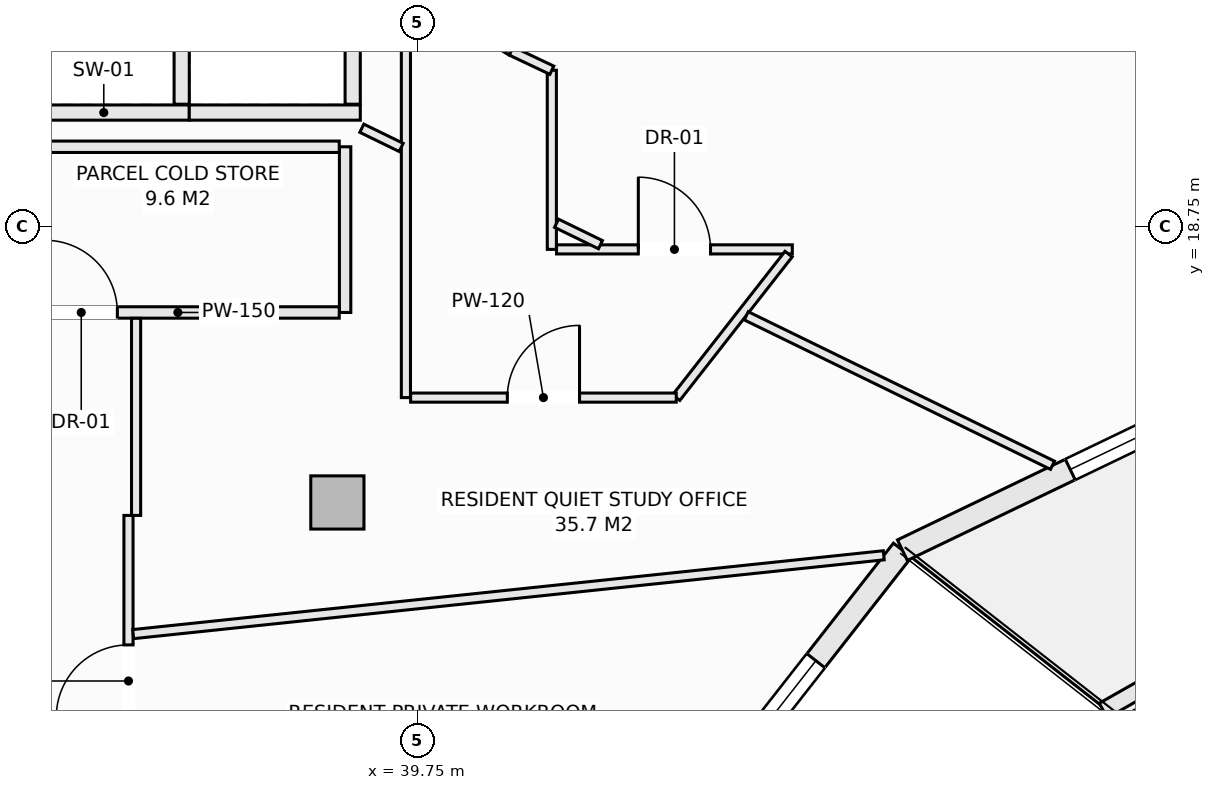
"""IFC4 building model, lengths in metres.
Left out: names, types, materials, properties, quantities, classifications, styles, units other than length and angle.
Written with IfcOpenShell. Run it as: python <this file> out.ifc"""

import sys

from ifc_helpers import new_model, si_unit, direction, frame, frame_2d, origin, origin_2d, place, context, subcontext, project, spatial, rectangle, extrude, element, fill, save


model = new_model("IFC4")
c1 = context("Model", 3, precision=1e-05, world=origin(), true_north=direction((0.0, 1.0)))
c2 = subcontext(c1, "Body", "Model", "MODEL_VIEW")
j1 = project(units=[si_unit("LENGTHUNIT", "METRE"), si_unit("PLANEANGLEUNIT", "RADIAN")], contexts=[c1])
p1 = place(None, origin())
s1 = spatial("IfcSite", under=j1, at=p1, CompositionType="ELEMENT")
p2 = place(p1, origin())
s2 = spatial("IfcBuilding", under=s1, at=p2, CompositionType="ELEMENT")
p3 = place(p2, frame((0.0, 0.0, 216.2)))
s3 = spatial("IfcBuildingStorey", under=s2, at=p3, CompositionType="ELEMENT", Elevation=216.2)
p4 = place(p3, frame((38.698, 15.121, -0.27), z_axis=(0.0, 0.0, 1.0), x_axis=(1.0, 0.0, 0.0)))
e1 = element("IfcColumn", 1, at=p4, inside=s3, PredefinedType="COLUMN", context=c2, shape_type="SweptSolid", body=[
    extrude(rectangle(XDim=0.7, YDim=0.7, at=origin_2d()), origin(), (0.0, 0.0, 1.0), 3.3),
])
p5 = place(p3, frame((42.5, 9.853, 0.0), z_axis=(0.0, 0.0, 1.0), x_axis=(0.616450126935, 0.787393955401, 0.0)))
e2 = element("IfcWall", 2, at=p5, inside=s3, PredefinedType="SOLIDWALL", context=c2, shape_type="SweptSolid", body=[
    extrude(rectangle(XDim=5.893, YDim=0.3, at=frame_2d((2.946, 0.0))), origin(), (0.0, 0.0, 1.0), 2.605),
])
p6 = place(p5, frame((1.846, 0.0, 0.72)))
e3 = element("IfcOpeningElement", 3, at=p6, cuts=e2, PredefinedType="OPENING", context=c2, shape_type="SweptSolid", body=[
    extrude(rectangle(XDim=2.2, YDim=1.65, at=frame_2d((1.1, 0.825))), frame((0.0, 0.16, 0.0), z_axis=(0.0, -1.0, 0.0), x_axis=(1.0, 0.0, 0.0)), (0.0, 0.0, 1.0), 0.32),
])
p7 = place(p3, frame((46.133, 14.493, 0.0), z_axis=(0.0, 0.0, 1.0), x_axis=(0.901348331142, 0.433094892545, 0.0)))
e4 = element("IfcWall", 4, at=p7, inside=s3, PredefinedType="SOLIDWALL", context=c2, shape_type="SweptSolid", body=[
    extrude(rectangle(XDim=6.021, YDim=0.3, at=frame_2d((3.01, 0.0))), origin(), (0.0, 0.0, 1.0), 2.605),
])
p8 = place(p7, frame((2.45, 0.0, 0.72)))
e5 = element("IfcOpeningElement", 5, at=p8, cuts=e4, PredefinedType="OPENING", context=c2, shape_type="SweptSolid", body=[
    extrude(rectangle(XDim=2.2, YDim=1.65, at=frame_2d((1.1, 0.825))), frame((0.0, 0.16, 0.0), z_axis=(0.0, -1.0, 0.0), x_axis=(1.0, 0.0, 0.0)), (0.0, 0.0, 1.0), 0.32),
])
p9 = place(p3, frame((48.776, 12.383, 0.0), z_axis=(0.0, 0.0, 1.0), x_axis=(0.869860619267, 0.493297580623, 0.0)))
e6 = element("IfcWall", 6, at=p9, inside=s3, PredefinedType="PARAPET", context=c2, shape_type="SweptSolid", body=[
    extrude(rectangle(XDim=6.743, YDim=0.22, at=frame_2d((3.371, 0.0))), origin(), (0.0, 0.0, 1.0), 0.52),
])
p10 = place(p3, frame((34.5, 20.25, 0.0), z_axis=(0.0, 0.0, 1.0), x_axis=(1.0, 0.0, 0.0)))
e7 = element("IfcWall", 7, at=p10, inside=s3, PredefinedType="SOLIDWALL", context=c2, shape_type="SweptSolid", body=[
    extrude(rectangle(XDim=2.25, YDim=0.2, at=frame_2d((1.125, 0.0))), origin(), (0.0, 0.0, 1.0), 3.03),
])
p11 = place(p3, frame((36.65, 20.36, 0.0), z_axis=(0.0, 0.0, 1.0), x_axis=(0.0, 1.0, 0.0)))
e8 = element("IfcWall", 8, at=p11, inside=s3, PredefinedType="SOLIDWALL", context=c2, shape_type="SweptSolid", body=[
    extrude(rectangle(XDim=2.43, YDim=0.2, at=frame_2d((1.215, 0.0))), origin(), (0.0, 0.0, 1.0), 3.03),
])
p12 = place(p3, frame((36.75, 20.25, 0.0), z_axis=(0.0, 0.0, 1.0), x_axis=(1.0, 0.0, 0.0)))
e9 = element("IfcWall", 9, at=p12, inside=s3, PredefinedType="SOLIDWALL", context=c2, shape_type="SweptSolid", body=[
    extrude(rectangle(XDim=2.25, YDim=0.2, at=frame_2d((1.125, 0.0))), origin(), (0.0, 0.0, 1.0), 3.03),
])
p13 = place(p3, frame((38.9, 20.36, 0.0), z_axis=(0.0, 0.0, 1.0), x_axis=(0.0, 1.0, 0.0)))
e10 = element("IfcWall", 10, at=p13, inside=s3, PredefinedType="SOLIDWALL", context=c2, shape_type="SweptSolid", body=[
    extrude(rectangle(XDim=2.43, YDim=0.2, at=frame_2d((1.215, 0.0))), origin(), (0.0, 0.0, 1.0), 3.03),
])
p14 = place(p3, frame((38.8, 17.62, 0.0), z_axis=(0.0, 0.0, 1.0), x_axis=(0.0, 1.0, 0.0)))
e11 = element("IfcWall", 11, at=p14, inside=s3, PredefinedType="PARTITIONING", context=c2, shape_type="SweptSolid", body=[
    extrude(rectangle(XDim=2.18, YDim=0.15, at=frame_2d((1.09, 0.0))), origin(), (0.0, 0.0, 1.0), 3.03),
])
p15 = place(p3, frame((34.477, 17.62, 0.0), z_axis=(0.0, 0.0, 1.0), x_axis=(1.0, 0.0, 0.0)))
e12 = element("IfcWall", 12, at=p15, inside=s3, PredefinedType="PARTITIONING", context=c2, shape_type="SweptSolid", body=[
    extrude(rectangle(XDim=4.246, YDim=0.15, at=frame_2d((2.123, 0.0))), origin(), (0.0, 0.0, 1.0), 3.03),
])
p16 = place(p15, frame((0.376, 0.0, 0.0)))
e13 = element("IfcOpeningElement", 13, at=p16, cuts=e12, PredefinedType="OPENING", context=c2, shape_type="SweptSolid", body=[
    extrude(rectangle(XDim=0.95, YDim=2.1, at=frame_2d((0.475, 1.05))), frame((0.0, 0.085, 0.0), z_axis=(0.0, -1.0, 0.0), x_axis=(1.0, 0.0, 0.0)), (0.0, 0.0, 1.0), 0.17),
])
p17 = place(p3, frame((34.477, 19.8, 0.0), z_axis=(0.0, 0.0, 1.0), x_axis=(1.0, 0.0, 0.0)))
e14 = element("IfcWall", 14, at=p17, inside=s3, PredefinedType="PARTITIONING", context=c2, shape_type="SweptSolid", body=[
    extrude(rectangle(XDim=4.246, YDim=0.15, at=frame_2d((2.123, 0.0))), origin(), (0.0, 0.0, 1.0), 3.03),
])
p18 = place(p3, frame((39.6, 16.5, 0.0), z_axis=(0.0, 0.0, 1.0), x_axis=(0.0, 1.0, 0.0)))
e15 = element("IfcWall", 15, at=p18, inside=s3, PredefinedType="PARTITIONING", context=c2, shape_type="SweptSolid", body=[
    extrude(rectangle(XDim=6.52, YDim=0.12, at=frame_2d((3.26, 0.0))), origin(), (0.0, 0.0, 1.0), 2.478),
])
p19 = place(p3, frame((41.52, 18.45, 0.0), z_axis=(0.0, 0.0, 1.0), x_axis=(0.0, 1.0, 0.0)))
e16 = element("IfcWall", 16, at=p19, inside=s3, PredefinedType="PARTITIONING", context=c2, shape_type="SweptSolid", body=[
    extrude(rectangle(XDim=2.357, YDim=0.12, at=frame_2d((1.178, 0.0))), origin(), (0.0, 0.0, 1.0), 3.03),
])
p20 = place(p3, frame((39.81, 21.764, 0.0), z_axis=(0.0, 0.0, 1.0), x_axis=(0.858011245414, -0.513630901273, 0.0)))
e17 = element("IfcWall", 17, at=p20, inside=s3, PredefinedType="PARTITIONING", context=c2, shape_type="SweptSolid", body=[
    extrude(rectangle(XDim=1.37, YDim=0.12, at=frame_2d((0.685, 0.0))), origin(), (0.0, 0.0, 1.0), 3.03),
])
p21 = place(p3, frame((40.986, 21.06, 0.0), z_axis=(0.0, 0.0, 1.0), x_axis=(0.90356951601, -0.428441512621, 0.0)))
e18 = element("IfcWall", 18, at=p21, inside=s3, PredefinedType="PARTITIONING", context=c2, shape_type="SweptSolid", body=[
    extrude(rectangle(XDim=0.591, YDim=0.12, at=frame_2d((0.295, 0.0))), origin(), (0.0, 0.0, 1.0), 3.03),
])
p22 = place(p3, frame((41.582, 18.45, 0.0), z_axis=(0.0, 0.0, 1.0), x_axis=(1.0, 0.0, 0.0)))
e19 = element("IfcWall", 19, at=p22, inside=s3, PredefinedType="PARTITIONING", context=c2, shape_type="SweptSolid", body=[
    extrude(rectangle(XDim=3.102, YDim=0.12, at=frame_2d((1.551, 0.0))), origin(), (0.0, 0.0, 1.0), 3.03),
])
p23 = place(p22, frame((1.076, 0.0, 0.0)))
e20 = element("IfcOpeningElement", 20, at=p23, cuts=e19, PredefinedType="OPENING", context=c2, shape_type="SweptSolid", body=[
    extrude(rectangle(XDim=0.95, YDim=2.1, at=frame_2d((0.475, 1.05))), frame((0.0, 0.07, 0.0), z_axis=(0.0, -1.0, 0.0), x_axis=(1.0, 0.0, 0.0)), (0.0, 0.0, 1.0), 0.14),
])
p24 = place(p3, frame((43.157, 16.5, 0.0), z_axis=(0.0, 0.0, 1.0), x_axis=(0.616566276607, 0.787303008092, 0.0)))
e21 = element("IfcWall", 21, at=p24, inside=s3, PredefinedType="PARTITIONING", context=c2, shape_type="SweptSolid", body=[
    extrude(rectangle(XDim=2.398, YDim=0.12, at=frame_2d((1.199, 0.0))), origin(), (0.0, 0.0, 1.0), 3.03),
])
p25 = place(p3, frame((39.662, 16.5, 0.0), z_axis=(0.0, 0.0, 1.0), x_axis=(1.0, 0.0, 0.0)))
e22 = element("IfcWall", 22, at=p25, inside=s3, PredefinedType="PARTITIONING", context=c2, shape_type="SweptSolid", body=[
    extrude(rectangle(XDim=3.495, YDim=0.12, at=frame_2d((1.748, 0.0))), origin(), (0.0, 0.0, 1.0), 2.77),
])
p26 = place(p25, frame((1.272, 0.0, 0.0)))
e23 = element("IfcOpeningElement", 23, at=p26, cuts=e22, PredefinedType="OPENING", context=c2, shape_type="SweptSolid", body=[
    extrude(rectangle(XDim=0.95, YDim=2.1, at=frame_2d((0.475, 1.05))), frame((0.0, 0.07, 0.0), z_axis=(0.0, -1.0, 0.0), x_axis=(1.0, 0.0, 0.0)), (0.0, 0.0, 1.0), 0.14),
])
p27 = place(p3, frame((36.05, 14.95, 0.0), z_axis=(0.0, 0.0, 1.0), x_axis=(0.0, 1.0, 0.0)))
e24 = element("IfcWall", 24, at=p27, inside=s3, PredefinedType="PARTITIONING", context=c2, shape_type="SweptSolid", body=[
    extrude(rectangle(XDim=2.593, YDim=0.12, at=frame_2d((1.296, 0.0))), origin(), (0.0, 0.0, 1.0), 3.03),
])
p28 = place(p3, frame((35.95, 11.75, 0.0), z_axis=(0.0, 0.0, 1.0), x_axis=(0.0, 1.0, 0.0)))
e25 = element("IfcWall", 25, at=p28, inside=s3, PredefinedType="PARTITIONING", context=c2, shape_type="SweptSolid", body=[
    extrude(rectangle(XDim=3.2, YDim=0.12, at=frame_2d((1.6, 0.0))), origin(), (0.0, 0.0, 1.0), 3.03),
])
p29 = place(p28, frame((0.547, 0.0, 0.0)))
e26 = element("IfcOpeningElement", 26, at=p29, cuts=e25, PredefinedType="OPENING", context=c2, shape_type="SweptSolid", body=[
    extrude(rectangle(XDim=0.95, YDim=2.1, at=frame_2d((0.475, 1.05))), frame((0.0, 0.07, 0.0), z_axis=(0.0, -1.0, 0.0), x_axis=(1.0, 0.0, 0.0)), (0.0, 0.0, 1.0), 0.14),
])
p30 = place(p3, frame((36.012, 13.388, 0.0), z_axis=(0.0, 0.0, 1.0), x_axis=(0.994530215, 0.104449276931, 0.0)))
e27 = element("IfcWall", 27, at=p30, inside=s3, PredefinedType="PARTITIONING", context=c2, shape_type="SweptSolid", body=[
    extrude(rectangle(XDim=9.929, YDim=0.12, at=frame_2d((4.965, 0.0))), origin(), (0.0, 0.0, 1.0), 3.03),
])
p31 = place(p3, frame((39.02, 20.044, 0.0), z_axis=(0.0, 0.0, 1.0), x_axis=(0.898788798226, -0.438381906769, 0.0)))
e28 = element("IfcWall", 28, at=p31, inside=s3, PredefinedType="PARTITIONING", context=c2, shape_type="SweptSolid", body=[
    extrude(rectangle(XDim=0.576, YDim=0.12, at=frame_2d((0.288, 0.0))), origin(), (0.0, 0.0, 1.0), 3.03),
])
p32 = place(p3, frame((41.582, 18.794, 0.0), z_axis=(0.0, 0.0, 1.0), x_axis=(0.898713702737, -0.438535837204, 0.0)))
e29 = element("IfcWall", 29, at=p32, inside=s3, PredefinedType="PARTITIONING", context=c2, shape_type="SweptSolid", body=[
    extrude(rectangle(XDim=0.643, YDim=0.12, at=frame_2d((0.322, 0.0))), origin(), (0.0, 0.0, 1.0), 3.03),
])
p33 = place(p3, frame((44.078, 17.576, 0.0), z_axis=(0.0, 0.0, 1.0), x_axis=(0.898720286075, -0.438522345381, 0.0)))
e30 = element("IfcWall", 30, at=p33, inside=s3, PredefinedType="PARTITIONING", context=c2, shape_type="SweptSolid", body=[
    extrude(rectangle(XDim=4.483, YDim=0.12, at=frame_2d((2.241, 0.0))), origin(), (0.0, 0.0, 1.0), 3.03),
])
p34 = place(p6, origin())
e31 = element("IfcWindow", 31, at=p34, inside=s3, PartitioningType="SINGLE_PANEL", PredefinedType="WINDOW", context=c2, shape_type="SweptSolid", body=[
    extrude(rectangle(XDim=2.2, YDim=1.65, at=frame_2d((1.1, 0.825))), frame((0.0, 0.03, 0.0), z_axis=(0.0, -1.0, 0.0), x_axis=(1.0, 0.0, 0.0)), (0.0, 0.0, 1.0), 0.06),
])
fill(e3, e31)
p35 = place(p8, origin())
e32 = element("IfcWindow", 32, at=p35, inside=s3, PartitioningType="SINGLE_PANEL", PredefinedType="WINDOW", context=c2, shape_type="SweptSolid", body=[
    extrude(rectangle(XDim=2.2, YDim=1.65, at=frame_2d((1.1, 0.825))), frame((0.0, 0.03, 0.0), z_axis=(0.0, -1.0, 0.0), x_axis=(1.0, 0.0, 0.0)), (0.0, 0.0, 1.0), 0.06),
])
fill(e5, e32)
p36 = place(p16, origin())
e33 = element("IfcDoor", 33, at=p36, inside=s3, OperationType="SINGLE_SWING_LEFT", PredefinedType="DOOR", context=c2, shape_type="SweptSolid", body=[
    extrude(rectangle(XDim=0.95, YDim=2.1, at=frame_2d((0.475, 1.05))), frame((0.0, 0.025, 0.0), z_axis=(0.0, -1.0, 0.0), x_axis=(1.0, 0.0, 0.0)), (0.0, 0.0, 1.0), 0.05),
])
fill(e13, e33)
p37 = place(p29, origin())
e34 = element("IfcDoor", 34, at=p37, inside=s3, OperationType="SINGLE_SWING_LEFT", PredefinedType="DOOR", context=c2, shape_type="SweptSolid", body=[
    extrude(rectangle(XDim=0.95, YDim=2.1, at=frame_2d((0.475, 1.05))), frame((0.0, 0.025, 0.0), z_axis=(0.0, -1.0, 0.0), x_axis=(1.0, 0.0, 0.0)), (0.0, 0.0, 1.0), 0.05),
])
fill(e26, e34)
p38 = place(p26, origin())
e35 = element("IfcDoor", 35, at=p38, inside=s3, OperationType="SINGLE_SWING_RIGHT", PredefinedType="DOOR", context=c2, shape_type="SweptSolid", body=[
    extrude(rectangle(XDim=0.95, YDim=2.1, at=frame_2d((0.475, 1.05))), frame((0.0, 0.025, 0.0), z_axis=(0.0, -1.0, 0.0), x_axis=(1.0, 0.0, 0.0)), (0.0, 0.0, 1.0), 0.05),
])
fill(e23, e35)
p39 = place(p23, origin())
e36 = element("IfcDoor", 36, at=p39, inside=s3, OperationType="SINGLE_SWING_LEFT", PredefinedType="DOOR", context=c2, shape_type="SweptSolid", body=[
    extrude(rectangle(XDim=0.95, YDim=2.1, at=frame_2d((0.475, 1.05))), frame((0.0, 0.025, 0.0), z_axis=(0.0, -1.0, 0.0), x_axis=(1.0, 0.0, 0.0)), (0.0, 0.0, 1.0), 0.05),
])
fill(e20, e36)
save(model, sys.argv[1])
